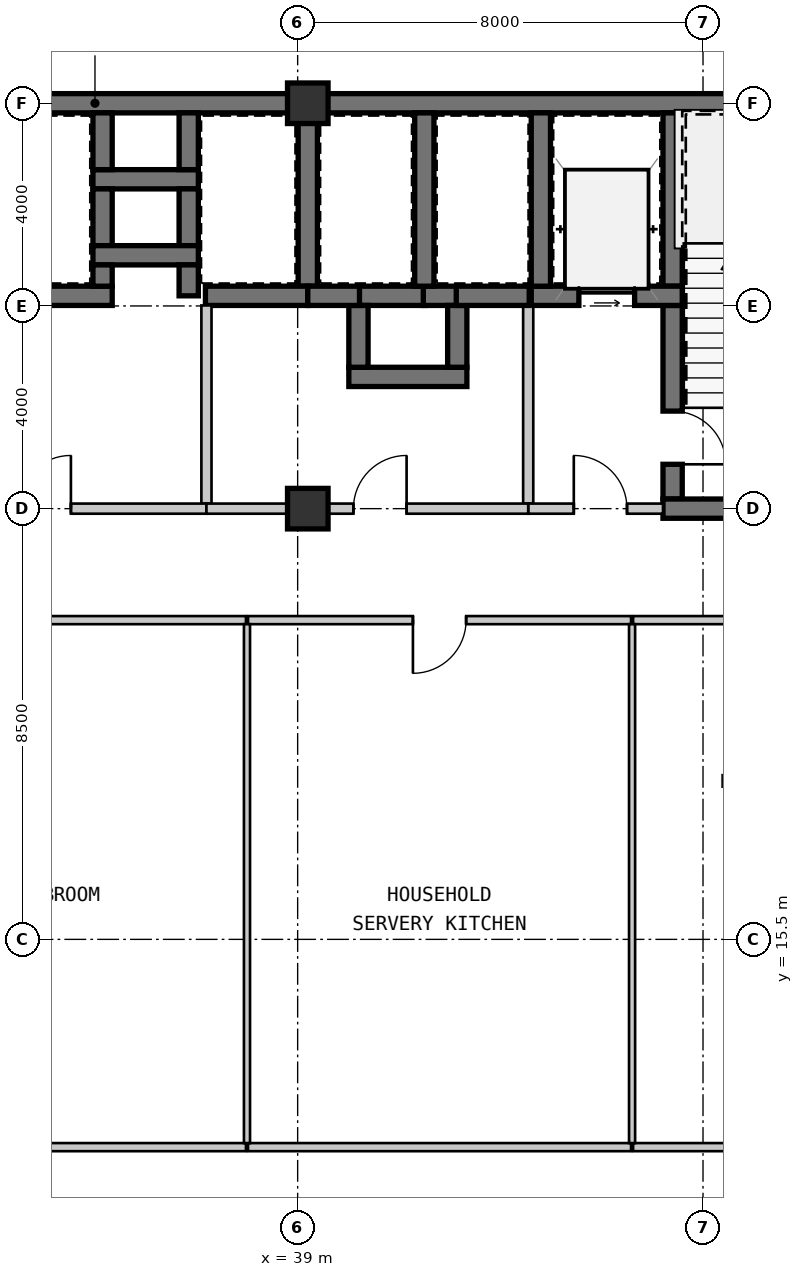
"""IFC4 building model, lengths in metres.
Left out: names, types, materials, properties, quantities, classifications, styles, units other than length and angle.
Written with IfcOpenShell. Run it as: python <this file> out.ifc"""

import sys

from ifc_helpers import new_model, si_unit, direction, frame, frame_2d, origin, origin_2d, place, context, subcontext, project, spatial, rectangle, extrude, source, transform, mapped, element, fill, save


model = new_model("IFC4")
c1 = context("Model", 3, precision=1e-05, world=origin(), true_north=direction((0.0, 1.0)))
c2 = subcontext(c1, "Body", "Model", "MODEL_VIEW")
j1 = project(units=[si_unit("LENGTHUNIT", "METRE"), si_unit("PLANEANGLEUNIT", "RADIAN")], contexts=[c1])
p1 = place(None, origin())
s1 = spatial("IfcSite", under=j1, at=p1, CompositionType="ELEMENT")
p2 = place(p1, origin())
s2 = spatial("IfcBuilding", under=s1, at=p2, CompositionType="ELEMENT")
p3 = place(p2, frame((0.0, 0.0, 51.45)))
s3 = spatial("IfcBuildingStorey", under=s2, at=p3, CompositionType="ELEMENT", Elevation=51.45)
m1 = source(origin(), c2, "Body", "SweptSolid", [
    extrude(rectangle(XDim=0.8, YDim=0.8, at=origin_2d()), origin(), (0.0, 0.0, 1.0), 3.15),
])
for number, where, z_axis, x_axis in (
    (1, (39.2, 24.0, 0.0), (0.0, 0.0, 1.0), (1.0, 0.0, 0.0)),
    (2, (39.2, 32.0, 0.0), (0.0, 0.0, 1.0), (1.0, 0.0, 0.0)),
):
    element("IfcColumn", number, at=place(p3, frame(where, z_axis=z_axis, x_axis=x_axis)), inside=s3, PredefinedType="COLUMN", context=c2, shape_type="MappedRepresentation", body=[
        mapped(m1, transform((0.0, 0.0, 0.0), scale=1.0)),
    ])
m2 = source(origin(), c2, "Body", "SweptSolid", [
    extrude(rectangle(XDim=11.2, YDim=0.38, at=frame_2d((5.6, 0.0))), origin(), (0.0, 0.0, 1.0), 2.93),
])
p4 = place(p3, frame((28.0, 32.0, 0.0), z_axis=(0.0, 0.0, 1.0), x_axis=(1.0, 0.0, 0.0)))
e3 = element("IfcWall", 3, at=p4, inside=s3, PredefinedType="SHEAR", context=c2, shape_type="MappedRepresentation", body=[
    mapped(m2, transform((0.0, 0.0, 0.0), scale=1.0)),
])
m3 = source(origin(), c2, "Body", "SweptSolid", [
    extrude(rectangle(XDim=11.99, YDim=0.38, at=frame_2d((5.995, 0.0))), origin(), (0.0, 0.0, 1.0), 2.93),
])
p5 = place(p3, frame((39.2, 32.0, 0.0), z_axis=(0.0, 0.0, 1.0), x_axis=(1.0, 0.0, 0.0)))
e4 = element("IfcWall", 4, at=p5, inside=s3, PredefinedType="SHEAR", context=c2, shape_type="MappedRepresentation", body=[
    mapped(m3, transform((0.0, 0.0, 0.0), scale=1.0)),
])
m4 = source(origin(), c2, "Body", "SweptSolid", [
    extrude(rectangle(XDim=3.42, YDim=0.38, at=frame_2d((1.71, 0.0))), origin(), (0.0, 0.0, 1.0), 2.93),
])
p6 = place(p3, frame((46.4, 31.81, 0.0), z_axis=(0.0, 0.0, 1.0), x_axis=(0.0, -1.0, 0.0)))
e5 = element("IfcWall", 5, at=p6, inside=s3, PredefinedType="SHEAR", context=c2, shape_type="MappedRepresentation", body=[
    mapped(m4, transform((0.0, 0.0, 0.0), scale=1.0)),
])
m5 = source(origin(), c2, "Body", "SweptSolid", [
    extrude(rectangle(XDim=3.82, YDim=0.38, at=frame_2d((1.91, 0.0))), origin(), (0.0, 0.0, 1.0), 2.93),
])
p7 = place(p3, frame((46.4, 28.01, 0.0), z_axis=(0.0, 0.0, 1.0), x_axis=(0.0, -1.0, 0.0)))
e6 = element("IfcWall", 6, at=p7, inside=s3, PredefinedType="SHEAR", context=c2, shape_type="MappedRepresentation", body=[
    mapped(m5, transform((0.0, 0.0, 0.0), scale=1.0)),
])
m6 = source(origin(), c2, "Body", "SweptSolid", [
    extrude(rectangle(XDim=1.05, YDim=2.1, at=frame_2d((0.525, 1.05))), frame((0.0, 0.2, 0.0), z_axis=(0.0, -1.0, 0.0), x_axis=(1.0, 0.0, 0.0)), (0.0, 0.0, 1.0), 0.4),
])
p8 = place(p7, frame((2.085, 0.0, 0.0)))
e7 = element("IfcOpeningElement", 7, at=p8, cuts=e6, PredefinedType="OPENING", context=c2, shape_type="MappedRepresentation", body=[
    mapped(m6, transform((0.0, 0.0, 0.0), scale=1.0)),
])
m7 = source(origin(), c2, "Body", "SweptSolid", [
    extrude(rectangle(XDim=4.98, YDim=0.38, at=frame_2d((2.49, 0.0))), origin(), (0.0, 0.0, 1.0), 2.93),
])
p9 = place(p3, frame((46.21, 24.0, 0.0), z_axis=(0.0, 0.0, 1.0), x_axis=(1.0, 0.0, 0.0)))
e8 = element("IfcWall", 8, at=p9, inside=s3, PredefinedType="SHEAR", context=c2, shape_type="MappedRepresentation", body=[
    mapped(m7, transform((0.0, 0.0, 0.0), scale=1.0)),
])
m8 = source(origin(), c2, "Body", "SweptSolid", [
    extrude(rectangle(XDim=2.98, YDim=0.38, at=frame_2d((1.49, 0.0))), origin(), (0.0, 0.0, 1.0), 2.93),
])
p10 = place(p3, frame((43.61, 28.2, 0.0), z_axis=(0.0, 0.0, 1.0), x_axis=(1.0, 0.0, 0.0)))
e9 = element("IfcWall", 9, at=p10, inside=s3, PredefinedType="SHEAR", context=c2, shape_type="MappedRepresentation", body=[
    mapped(m8, transform((0.0, 0.0, 0.0), scale=1.0)),
])
m9 = source(origin(), c2, "Body", "SweptSolid", [
    extrude(rectangle(XDim=1.1, YDim=2.15, at=frame_2d((0.55, 1.075))), frame((0.0, 0.2, 0.0), z_axis=(0.0, -1.0, 0.0), x_axis=(1.0, 0.0, 0.0)), (0.0, 0.0, 1.0), 0.4),
])
p11 = place(p10, frame((0.94, 0.0, 0.0)))
e10 = element("IfcOpeningElement", 10, at=p11, cuts=e9, PredefinedType="OPENING", context=c2, shape_type="MappedRepresentation", body=[
    mapped(m9, transform((0.0, 0.0, 0.0), scale=1.0)),
])
p12 = place(p3, frame((43.8, 31.81, 0.0), z_axis=(0.0, 0.0, 1.0), x_axis=(0.0, -1.0, 0.0)))
e11 = element("IfcWall", 11, at=p12, inside=s3, PredefinedType="SHEAR", context=c2, shape_type="MappedRepresentation", body=[
    mapped(m4, transform((0.0, 0.0, 0.0), scale=1.0)),
])
m10 = source(origin(), c2, "Body", "SweptSolid", [
    extrude(rectangle(XDim=3.91, YDim=0.2, at=frame_2d((1.955, 0.0))), origin(), (0.0, 0.0, 1.0), 2.93),
])
p13 = place(p3, frame((43.55, 28.01, 0.0), z_axis=(0.0, 0.0, 1.0), x_axis=(0.0, -1.0, 0.0)))
e12 = element("IfcWall", 12, at=p13, inside=s3, PredefinedType="SOLIDWALL", context=c2, shape_type="MappedRepresentation", body=[
    mapped(m10, transform((0.0, 0.0, 0.0), scale=1.0)),
])
m11 = source(origin(), c2, "Body", "SweptSolid", [
    extrude(rectangle(XDim=2.66, YDim=0.2, at=frame_2d((1.33, 0.0))), origin(), (0.0, 0.0, 1.0), 2.397),
])
p14 = place(p3, frame((43.55, 24.0, 0.0), z_axis=(0.0, 0.0, 1.0), x_axis=(1.0, 0.0, 0.0)))
e13 = element("IfcWall", 13, at=p14, inside=s3, PredefinedType="SOLIDWALL", context=c2, shape_type="MappedRepresentation", body=[
    mapped(m11, transform((0.0, 0.0, 0.0), scale=1.0)),
])
m12 = source(origin(), c2, "Body", "SweptSolid", [
    extrude(rectangle(XDim=1.05, YDim=2.1, at=frame_2d((0.525, 1.05))), frame((0.0, 0.11, 0.0), z_axis=(0.0, -1.0, 0.0), x_axis=(1.0, 0.0, 0.0)), (0.0, 0.0, 1.0), 0.22),
])
p15 = place(p14, frame((0.9, 0.0, 0.0)))
e14 = element("IfcOpeningElement", 14, at=p15, cuts=e13, PredefinedType="OPENING", context=c2, shape_type="MappedRepresentation", body=[
    mapped(m12, transform((0.0, 0.0, 0.0), scale=1.0)),
])
m13 = source(origin(), c2, "Body", "SweptSolid", [
    extrude(rectangle(XDim=2.08, YDim=0.38, at=frame_2d((1.04, 0.0))), origin(), (0.0, 0.0, 1.0), 2.93),
])
p16 = place(p3, frame((34.96, 30.5, 0.0), z_axis=(0.0, 0.0, 1.0), x_axis=(1.0, 0.0, 0.0)))
e15 = element("IfcWall", 15, at=p16, inside=s3, PredefinedType="SHEAR", context=c2, shape_type="MappedRepresentation", body=[
    mapped(m13, transform((0.0, 0.0, 0.0), scale=1.0)),
])
m14 = source(origin(), c2, "Body", "SweptSolid", [
    extrude(rectangle(XDim=1.12, YDim=0.38, at=frame_2d((0.56, 0.0))), origin(), (0.0, 0.0, 1.0), 2.93),
])
for number, where, z_axis, x_axis in (
    (16, (35.15, 31.81, 0.0), (0.0, 0.0, 1.0), (0.0, -1.0, 0.0)),
    (17, (36.85, 30.69, 0.0), (0.0, 0.0, 1.0), (0.0, 1.0, 0.0)),
    (18, (35.15, 30.31, 0.0), (0.0, 0.0, 1.0), (0.0, -1.0, 0.0)),
    (19, (36.85, 29.19, 0.0), (0.0, 0.0, 1.0), (0.0, 1.0, 0.0)),
):
    element("IfcWall", number, at=place(p3, frame(where, z_axis=z_axis, x_axis=x_axis)), inside=s3, PredefinedType="SHEAR", context=c2, shape_type="MappedRepresentation", body=[
        mapped(m14, transform((0.0, 0.0, 0.0), scale=1.0)),
    ])
p17 = place(p3, frame((34.96, 29.0, 0.0), z_axis=(0.0, 0.0, 1.0), x_axis=(1.0, 0.0, 0.0)))
e20 = element("IfcWall", 20, at=p17, inside=s3, PredefinedType="SHEAR", context=c2, shape_type="MappedRepresentation", body=[
    mapped(m13, transform((0.0, 0.0, 0.0), scale=1.0)),
])
m15 = source(origin(), c2, "Body", "SweptSolid", [
    extrude(rectangle(XDim=1.32, YDim=0.38, at=frame_2d((0.66, 0.0))), origin(), (0.0, 0.0, 1.0), 2.93),
])
p18 = place(p3, frame((41.52, 28.2, 0.0), z_axis=(0.0, 0.0, 1.0), x_axis=(-1.0, 0.0, 0.0)))
e21 = element("IfcWall", 21, at=p18, inside=s3, PredefinedType="SHEAR", context=c2, shape_type="MappedRepresentation", body=[
    mapped(m15, transform((0.0, 0.0, 0.0), scale=1.0)),
])
m16 = source(origin(), c2, "Body", "SweptSolid", [
    extrude(rectangle(XDim=0.67, YDim=0.38, at=frame_2d((0.335, 0.0))), origin(), (0.0, 0.0, 1.0), 2.93),
])
p19 = place(p3, frame((42.15, 28.2, 0.0), z_axis=(0.0, 0.0, 1.0), x_axis=(-1.0, 0.0, 0.0)))
e22 = element("IfcWall", 22, at=p19, inside=s3, PredefinedType="SHEAR", context=c2, shape_type="MappedRepresentation", body=[
    mapped(m16, transform((0.0, 0.0, 0.0), scale=1.0)),
])
m17 = source(origin(), c2, "Body", "SweptSolid", [
    extrude(rectangle(XDim=2.33, YDim=0.38, at=frame_2d((1.165, 0.0))), origin(), (0.0, 0.0, 1.0), 2.93),
])
p20 = place(p3, frame((40.01, 26.6, 0.0), z_axis=(0.0, 0.0, 1.0), x_axis=(1.0, 0.0, 0.0)))
e23 = element("IfcWall", 23, at=p20, inside=s3, PredefinedType="SHEAR", context=c2, shape_type="MappedRepresentation", body=[
    mapped(m17, transform((0.0, 0.0, 0.0), scale=1.0)),
])
m18 = source(origin(), c2, "Body", "SweptSolid", [
    extrude(rectangle(XDim=1.22, YDim=0.38, at=frame_2d((0.61, 0.0))), origin(), (0.0, 0.0, 1.0), 2.93),
])
for number, where, z_axis, x_axis in (
    (24, (40.2, 28.01, 0.0), (0.0, 0.0, 1.0), (0.0, -1.0, 0.0)),
    (25, (42.15, 26.79, 0.0), (0.0, 0.0, 1.0), (0.0, 1.0, 0.0)),
):
    element("IfcWall", number, at=place(p3, frame(where, z_axis=z_axis, x_axis=x_axis)), inside=s3, PredefinedType="SHEAR", context=c2, shape_type="MappedRepresentation", body=[
        mapped(m18, transform((0.0, 0.0, 0.0), scale=1.0)),
    ])
m19 = source(origin(), c2, "Body", "SweptSolid", [
    extrude(rectangle(XDim=2.68, YDim=0.38, at=frame_2d((1.34, 0.0))), origin(), (0.0, 0.0, 1.0), 2.93),
])
p21 = place(p3, frame((32.66, 28.2, 0.0), z_axis=(0.0, 0.0, 1.0), x_axis=(1.0, 0.0, 0.0)))
e26 = element("IfcWall", 26, at=p21, inside=s3, PredefinedType="SHEAR", context=c2, shape_type="MappedRepresentation", body=[
    mapped(m19, transform((0.0, 0.0, 0.0), scale=1.0)),
])
m20 = source(origin(), c2, "Body", "SweptSolid", [
    extrude(rectangle(XDim=0.42, YDim=0.38, at=frame_2d((0.21, 0.0))), origin(), (0.0, 0.0, 1.0), 2.93),
])
p22 = place(p3, frame((35.15, 28.39, 0.0), z_axis=(0.0, 0.0, 1.0), x_axis=(0.0, 1.0, 0.0)))
e27 = element("IfcWall", 27, at=p22, inside=s3, PredefinedType="SHEAR", context=c2, shape_type="MappedRepresentation", body=[
    mapped(m20, transform((0.0, 0.0, 0.0), scale=1.0)),
])
p23 = place(p3, frame((39.2, 28.39, 0.0), z_axis=(0.0, 0.0, 1.0), x_axis=(0.0, 1.0, 0.0)))
e28 = element("IfcWall", 28, at=p23, inside=s3, PredefinedType="SHEAR", context=c2, shape_type="MappedRepresentation", body=[
    mapped(m4, transform((0.0, 0.0, 0.0), scale=1.0)),
])
m21 = source(origin(), c2, "Body", "SweptSolid", [
    extrude(rectangle(XDim=0.61, YDim=0.38, at=frame_2d((0.305, 0.0))), origin(), (0.0, 0.0, 1.0), 2.93),
])
p24 = place(p3, frame((36.85, 28.81, 0.0), z_axis=(0.0, 0.0, 1.0), x_axis=(0.0, -1.0, 0.0)))
e29 = element("IfcWall", 29, at=p24, inside=s3, PredefinedType="SHEAR", context=c2, shape_type="MappedRepresentation", body=[
    mapped(m21, transform((0.0, 0.0, 0.0), scale=1.0)),
])
m22 = source(origin(), c2, "Body", "SweptSolid", [
    extrude(rectangle(XDim=2.02, YDim=0.38, at=frame_2d((1.01, 0.0))), origin(), (0.0, 0.0, 1.0), 2.93),
])
p25 = place(p3, frame((37.18, 28.2, 0.0), z_axis=(0.0, 0.0, 1.0), x_axis=(1.0, 0.0, 0.0)))
e30 = element("IfcWall", 30, at=p25, inside=s3, PredefinedType="SHEAR", context=c2, shape_type="MappedRepresentation", body=[
    mapped(m22, transform((0.0, 0.0, 0.0), scale=1.0)),
])
p26 = place(p3, frame((41.5, 28.39, 0.0), z_axis=(0.0, 0.0, 1.0), x_axis=(0.0, 1.0, 0.0)))
e31 = element("IfcWall", 31, at=p26, inside=s3, PredefinedType="SHEAR", context=c2, shape_type="MappedRepresentation", body=[
    mapped(m4, transform((0.0, 0.0, 0.0), scale=1.0)),
])
m23 = source(origin(), c2, "Body", "SweptSolid", [
    extrude(rectangle(XDim=1.02, YDim=0.38, at=frame_2d((0.51, 0.0))), origin(), (0.0, 0.0, 1.0), 2.93),
])
p27 = place(p3, frame((39.2, 28.2, 0.0), z_axis=(0.0, 0.0, 1.0), x_axis=(1.0, 0.0, 0.0)))
e32 = element("IfcWall", 32, at=p27, inside=s3, PredefinedType="SHEAR", context=c2, shape_type="MappedRepresentation", body=[
    mapped(m23, transform((0.0, 0.0, 0.0), scale=1.0)),
])
m24 = source(origin(), c2, "Body", "SweptSolid", [
    extrude(rectangle(XDim=1.44, YDim=0.38, at=frame_2d((0.72, 0.0))), origin(), (0.0, 0.0, 1.0), 2.93),
])
p28 = place(p3, frame((42.13, 28.2, 0.0), z_axis=(0.0, 0.0, 1.0), x_axis=(1.0, 0.0, 0.0)))
e33 = element("IfcWall", 33, at=p28, inside=s3, PredefinedType="SHEAR", context=c2, shape_type="MappedRepresentation", body=[
    mapped(m24, transform((0.0, 0.0, 0.0), scale=1.0)),
])
p29 = place(p3, frame((37.2, 28.01, 0.0), z_axis=(0.0, 0.0, 1.0), x_axis=(0.0, -1.0, 0.0)))
e34 = element("IfcWall", 34, at=p29, inside=s3, PredefinedType="SOLIDWALL", context=c2, shape_type="MappedRepresentation", body=[
    mapped(m10, transform((0.0, 0.0, 0.0), scale=1.0)),
])
m25 = source(origin(), c2, "Body", "SweptSolid", [
    extrude(rectangle(XDim=6.4, YDim=0.2, at=frame_2d((3.2, 0.0))), origin(), (0.0, 0.0, 1.0), 2.47),
])
p30 = place(p3, frame((37.2, 24.0, 0.0), z_axis=(0.0, 0.0, 1.0), x_axis=(-1.0, 0.0, 0.0)))
e35 = element("IfcWall", 35, at=p30, inside=s3, PredefinedType="SOLIDWALL", context=c2, shape_type="MappedRepresentation", body=[
    mapped(m25, transform((0.0, 0.0, 0.0), scale=1.0)),
])
p31 = place(p30, frame((2.675, 0.0, 0.0)))
e36 = element("IfcOpeningElement", 36, at=p31, cuts=e35, PredefinedType="OPENING", context=c2, shape_type="MappedRepresentation", body=[
    mapped(m12, transform((0.0, 0.0, 0.0), scale=1.0)),
])
m26 = source(origin(), c2, "Body", "SweptSolid", [
    extrude(rectangle(XDim=4.35, YDim=0.2, at=frame_2d((2.175, 0.0))), origin(), (0.0, 0.0, 1.0), 2.397),
])
p32 = place(p3, frame((43.55, 24.0, 0.0), z_axis=(0.0, 0.0, 1.0), x_axis=(-1.0, 0.0, 0.0)))
e37 = element("IfcWall", 37, at=p32, inside=s3, PredefinedType="SOLIDWALL", context=c2, shape_type="MappedRepresentation", body=[
    mapped(m26, transform((0.0, 0.0, 0.0), scale=1.0)),
])
p33 = place(p32, frame((2.4, 0.0, 0.0)))
e38 = element("IfcOpeningElement", 38, at=p33, cuts=e37, PredefinedType="OPENING", context=c2, shape_type="MappedRepresentation", body=[
    mapped(m12, transform((0.0, 0.0, 0.0), scale=1.0)),
])
m27 = source(origin(), c2, "Body", "SweptSolid", [
    extrude(rectangle(XDim=2.0, YDim=0.2, at=frame_2d((1.0, 0.0))), origin(), (0.0, 0.0, 1.0), 2.47),
])
p34 = place(p3, frame((39.2, 24.0, 0.0), z_axis=(0.0, 0.0, 1.0), x_axis=(-1.0, 0.0, 0.0)))
e39 = element("IfcWall", 39, at=p34, inside=s3, PredefinedType="SOLIDWALL", context=c2, shape_type="MappedRepresentation", body=[
    mapped(m27, transform((0.0, 0.0, 0.0), scale=1.0)),
])
m28 = source(origin(), c2, "Body", "SweptSolid", [
    extrude(rectangle(XDim=21.159, YDim=0.16, at=frame_2d((10.58, 0.0))), origin(), (0.0, 0.0, 1.0), 2.93),
])
p35 = place(p3, frame((37.98, 21.8, 0.0), z_axis=(0.0, 0.0, 1.0), x_axis=(-1.0, 0.0, 0.0)))
e40 = element("IfcWall", 40, at=p35, inside=s3, PredefinedType="PARTITIONING", context=c2, shape_type="MappedRepresentation", body=[
    mapped(m28, transform((0.0, 0.0, 0.0), scale=1.0)),
])
m29 = source(origin(), c2, "Body", "SweptSolid", [
    extrude(rectangle(XDim=0.92, YDim=2.1, at=frame_2d((0.46, 1.05))), frame((0.0, 0.09, 0.0), z_axis=(0.0, -1.0, 0.0), x_axis=(1.0, 0.0, 0.0)), (0.0, 0.0, 1.0), 0.18),
])
p36 = place(p35, frame((10.12, 0.0, 0.0)))
e41 = element("IfcOpeningElement", 41, at=p36, cuts=e40, PredefinedType="OPENING", context=c2, shape_type="MappedRepresentation", body=[
    mapped(m29, transform((0.0, 0.0, 0.0), scale=1.0)),
])
m30 = source(origin(), c2, "Body", "SweptSolid", [
    extrude(rectangle(XDim=7.56, YDim=0.16, at=frame_2d((3.78, 0.0))), origin(), (0.0, 0.0, 1.0), 2.93),
])
p37 = place(p3, frame((45.58, 21.8, 0.0), z_axis=(0.0, 0.0, 1.0), x_axis=(-1.0, 0.0, 0.0)))
e42 = element("IfcWall", 42, at=p37, inside=s3, PredefinedType="PARTITIONING", context=c2, shape_type="MappedRepresentation", body=[
    mapped(m30, transform((0.0, 0.0, 0.0), scale=1.0)),
])
m31 = source(origin(), c2, "Body", "SweptSolid", [
    extrude(rectangle(XDim=1.05, YDim=2.1, at=frame_2d((0.525, 1.05))), frame((0.0, 0.09, 0.0), z_axis=(0.0, -1.0, 0.0), x_axis=(1.0, 0.0, 0.0)), (0.0, 0.0, 1.0), 0.18),
])
p38 = place(p37, frame((3.255, 0.0, 0.0)))
e43 = element("IfcOpeningElement", 43, at=p38, cuts=e42, PredefinedType="OPENING", context=c2, shape_type="MappedRepresentation", body=[
    mapped(m31, transform((0.0, 0.0, 0.0), scale=1.0)),
])
p39 = place(p3, frame((53.18, 21.8, 0.0), z_axis=(0.0, 0.0, 1.0), x_axis=(-1.0, 0.0, 0.0)))
e44 = element("IfcWall", 44, at=p39, inside=s3, PredefinedType="PARTITIONING", context=c2, shape_type="MappedRepresentation", body=[
    mapped(m30, transform((0.0, 0.0, 0.0), scale=1.0)),
])
m32 = source(origin(), c2, "Body", "SweptSolid", [
    extrude(rectangle(XDim=21.1, YDim=0.16, at=frame_2d((10.55, 0.0))), origin(), (0.0, 0.0, 1.0), 2.93),
])
p40 = place(p3, frame((16.88, 11.4, 0.0), z_axis=(0.0, 0.0, 1.0), x_axis=(1.0, 0.0, 0.0)))
e45 = element("IfcWall", 45, at=p40, inside=s3, PredefinedType="PARTITIONING", context=c2, shape_type="MappedRepresentation", body=[
    mapped(m32, transform((0.0, 0.0, 0.0), scale=1.0)),
])
p41 = place(p3, frame((38.02, 11.4, 0.0), z_axis=(0.0, 0.0, 1.0), x_axis=(1.0, 0.0, 0.0)))
e46 = element("IfcWall", 46, at=p41, inside=s3, PredefinedType="PARTITIONING", context=c2, shape_type="MappedRepresentation", body=[
    mapped(m30, transform((0.0, 0.0, 0.0), scale=1.0)),
])
m33 = source(origin(), c2, "Body", "SweptSolid", [
    extrude(rectangle(XDim=7.5, YDim=0.16, at=frame_2d((3.75, 0.0))), origin(), (0.0, 0.0, 1.0), 2.93),
])
p42 = place(p3, frame((45.62, 11.4, 0.0), z_axis=(0.0, 0.0, 1.0), x_axis=(1.0, 0.0, 0.0)))
e47 = element("IfcWall", 47, at=p42, inside=s3, PredefinedType="PARTITIONING", context=c2, shape_type="MappedRepresentation", body=[
    mapped(m33, transform((0.0, 0.0, 0.0), scale=1.0)),
])
m34 = source(origin(), c2, "Body", "SweptSolid", [
    extrude(rectangle(XDim=10.24, YDim=0.12, at=frame_2d((5.12, 0.0))), origin(), (0.0, 0.0, 1.0), 2.93),
])
for number, where, z_axis, x_axis in (
    (48, (38.0, 21.72, 0.0), (0.0, 0.0, 1.0), (0.0, -1.0, 0.0)),
    (49, (45.6, 21.72, 0.0), (0.0, 0.0, 1.0), (0.0, -1.0, 0.0)),
):
    element("IfcWall", number, at=place(p3, frame(where, z_axis=z_axis, x_axis=x_axis)), inside=s3, PredefinedType="PARTITIONING", context=c2, shape_type="MappedRepresentation", body=[
        mapped(m34, transform((0.0, 0.0, 0.0), scale=1.0)),
    ])
m35 = source(origin(), c2, "Body", "SweptSolid", [
    extrude(rectangle(XDim=1.05, YDim=2.1, at=frame_2d((0.525, 1.05))), frame((0.0, 0.025, 0.0), z_axis=(0.0, -1.0, 0.0), x_axis=(1.0, 0.0, 0.0)), (0.0, 0.0, 1.0), 0.05),
])
p43 = place(p8, origin())
e50 = element("IfcDoor", 50, at=p43, inside=s3, OperationType="SINGLE_SWING_RIGHT", PredefinedType="DOOR", context=c2, shape_type="MappedRepresentation", body=[
    mapped(m35, transform((0.0, 0.0, 0.0), scale=1.0)),
])
fill(e7, e50)
m36 = source(origin(), c2, "Body", "SweptSolid", [
    extrude(rectangle(XDim=1.1, YDim=2.15, at=frame_2d((0.55, 1.075))), frame((0.0, 0.025, 0.0), z_axis=(0.0, -1.0, 0.0), x_axis=(1.0, 0.0, 0.0)), (0.0, 0.0, 1.0), 0.05),
])
p44 = place(p11, origin())
e51 = element("IfcDoor", 51, at=p44, inside=s3, OperationType="SLIDING_TO_LEFT", PredefinedType="DOOR", context=c2, shape_type="MappedRepresentation", body=[
    mapped(m36, transform((0.0, 0.0, 0.0), scale=1.0)),
])
fill(e10, e51)
p45 = place(p15, origin())
e52 = element("IfcDoor", 52, at=p45, inside=s3, OperationType="SINGLE_SWING_LEFT", PredefinedType="DOOR", context=c2, shape_type="MappedRepresentation", body=[
    mapped(m35, transform((0.0, 0.0, 0.0), scale=1.0)),
])
fill(e14, e52)
p46 = place(p31, frame((1.05, 0.0, 0.0), z_axis=(0.0, 0.0, 1.0), x_axis=(-1.0, 0.0, 0.0)))
e53 = element("IfcDoor", 53, at=p46, inside=s3, OperationType="SINGLE_SWING_RIGHT", PredefinedType="DOOR", context=c2, shape_type="MappedRepresentation", body=[
    mapped(m35, transform((0.0, 0.0, 0.0), scale=1.0)),
])
fill(e36, e53)
p47 = place(p33, frame((1.05, 0.0, 0.0), z_axis=(0.0, 0.0, 1.0), x_axis=(-1.0, 0.0, 0.0)))
e54 = element("IfcDoor", 54, at=p47, inside=s3, OperationType="SINGLE_SWING_RIGHT", PredefinedType="DOOR", context=c2, shape_type="MappedRepresentation", body=[
    mapped(m35, transform((0.0, 0.0, 0.0), scale=1.0)),
])
fill(e38, e54)
p48 = place(p38, origin())
e55 = element("IfcDoor", 55, at=p48, inside=s3, OperationType="SINGLE_SWING_RIGHT", PredefinedType="DOOR", context=c2, shape_type="MappedRepresentation", body=[
    mapped(m35, transform((0.0, 0.0, 0.0), scale=1.0)),
])
fill(e43, e55)
save(model, sys.argv[1])
